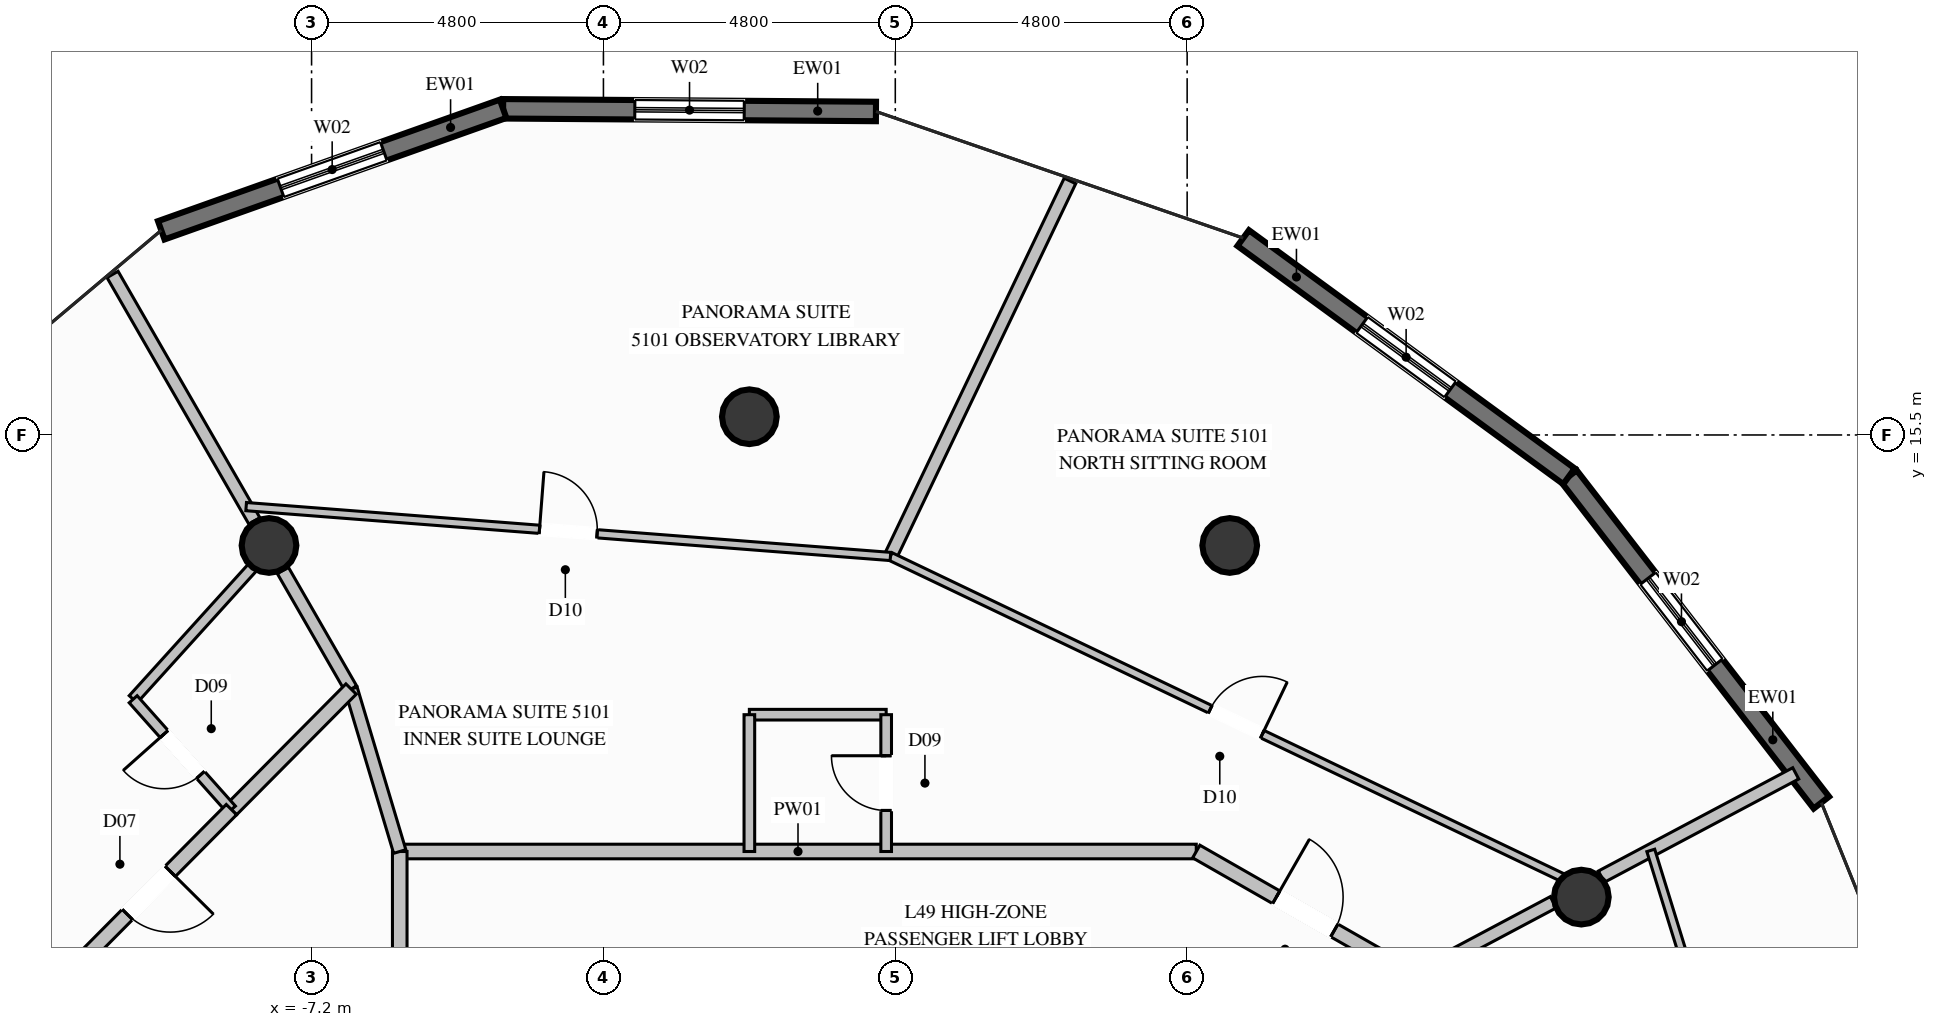
"""IFC4 building model, lengths in metres.
Left out: names, types, materials, properties, quantities, classifications, styles, units other than length and angle.
Written with IfcOpenShell. Run it as: python <this file> out.ifc"""

import sys

from ifc_helpers import new_model, si_unit, direction, frame, frame_2d, origin, origin_2d, place, context, subcontext, project, spatial, rectangle, circle, extrude, element, fill, save


model = new_model("IFC4")
c1 = context("Model", 3, precision=1e-05, world=origin(), true_north=direction((0.0, 1.0)))
c2 = subcontext(c1, "Body", "Model", "MODEL_VIEW")
j1 = project(units=[si_unit("LENGTHUNIT", "METRE"), si_unit("PLANEANGLEUNIT", "RADIAN")], contexts=[c1])
p1 = place(None, origin())
s1 = spatial("IfcSite", under=j1, at=p1, CompositionType="ELEMENT")
p2 = place(p1, origin())
s2 = spatial("IfcBuilding", under=s1, at=p2, CompositionType="ELEMENT")
p3 = place(p2, frame((0.0, 0.0, 191.2)))
s3 = spatial("IfcBuildingStorey", under=s2, at=p3, CompositionType="ELEMENT", Elevation=191.2)
for number, where, z_axis, x_axis in (
    (1, (13.683, 7.9, 0.0), (0.0, 0.0, 1.0), (1.0, 0.0, 0.0)),
    (2, (7.9, 13.683, 0.0), (0.0, 0.0, 1.0), (1.0, 0.0, 0.0)),
    (3, (0.0, 15.8, 0.0), (0.0, 0.0, 1.0), (1.0, 0.0, 0.0)),
    (4, (-7.9, 13.683, 0.0), (0.0, 0.0, 1.0), (1.0, 0.0, 0.0)),
):
    element("IfcColumn", number, at=place(p3, frame(where, z_axis=z_axis, x_axis=x_axis)), inside=s3, PredefinedType="COLUMN", context=c2, shape_type="SweptSolid", body=[
        extrude(circle(Radius=0.45, at=origin_2d()), origin(), (0.0, 0.0, 1.0), 3.6),
    ])
p4 = place(p3, frame((13.48, 14.821, 0.0), z_axis=(0.0, 0.0, 1.0), x_axis=(0.611810985794, -0.791003993455, 0.0)))
e5 = element("IfcWall", 5, at=p4, inside=s3, PredefinedType="SOLIDWALL", context=c2, shape_type="SweptSolid", body=[
    extrude(rectangle(XDim=6.785, YDim=0.32, at=frame_2d((3.393, 0.0))), origin(), (0.0, 0.0, 1.0), 3.36),
])
p5 = place(p4, frame((2.123, 0.0, 0.35)))
e6 = element("IfcOpeningElement", 6, at=p5, cuts=e5, PredefinedType="OPENING", context=c2, shape_type="SweptSolid", body=[
    extrude(rectangle(XDim=1.8, YDim=2.6, at=frame_2d((0.9, 1.3))), frame((0.0, 0.17, 0.0), z_axis=(0.0, -1.0, 0.0), x_axis=(1.0, 0.0, 0.0)), (0.0, 0.0, 1.0), 0.34),
])
p6 = place(p3, frame((8.122, 18.738, 0.0), z_axis=(0.0, 0.0, 1.0), x_axis=(0.80727653181, -0.590173365368, 0.0)))
e7 = element("IfcWall", 7, at=p6, inside=s3, PredefinedType="SOLIDWALL", context=c2, shape_type="SweptSolid", body=[
    extrude(rectangle(XDim=6.637, YDim=0.32, at=frame_2d((3.318, 0.0))), origin(), (0.0, 0.0, 1.0), 3.36),
])
p7 = place(p6, frame((2.419, 0.0, 0.35)))
e8 = element("IfcOpeningElement", 8, at=p7, cuts=e7, PredefinedType="OPENING", context=c2, shape_type="SweptSolid", body=[
    extrude(rectangle(XDim=1.8, YDim=2.6, at=frame_2d((0.9, 1.3))), frame((0.0, 0.17, 0.0), z_axis=(0.0, -1.0, 0.0), x_axis=(1.0, 0.0, 0.0)), (0.0, 0.0, 1.0), 0.34),
])
p8 = place(p3, frame((-4.05, 20.864, 0.0), z_axis=(0.0, 0.0, 1.0), x_axis=(0.999974321908, -0.007166276942, 0.0)))
e9 = element("IfcWall", 9, at=p8, inside=s3, PredefinedType="SOLIDWALL", context=c2, shape_type="SweptSolid", body=[
    extrude(rectangle(XDim=6.132, YDim=0.32, at=frame_2d((3.066, 0.0))), origin(), (0.0, 0.0, 1.0), 3.36),
])
p9 = place(p8, frame((2.166, 0.0, 0.35)))
e10 = element("IfcOpeningElement", 10, at=p9, cuts=e9, PredefinedType="OPENING", context=c2, shape_type="SweptSolid", body=[
    extrude(rectangle(XDim=1.8, YDim=2.6, at=frame_2d((0.9, 1.3))), frame((0.0, 0.17, 0.0), z_axis=(0.0, -1.0, 0.0), x_axis=(1.0, 0.0, 0.0)), (0.0, 0.0, 1.0), 0.34),
])
p10 = place(p3, frame((-9.672, 18.866, 0.0), z_axis=(0.0, 0.0, 1.0), x_axis=(0.942262899703, 0.334874047732, 0.0)))
e11 = element("IfcWall", 11, at=p10, inside=s3, PredefinedType="SOLIDWALL", context=c2, shape_type="SweptSolid", body=[
    extrude(rectangle(XDim=5.967, YDim=0.32, at=frame_2d((2.983, 0.0))), origin(), (0.0, 0.0, 1.0), 3.36),
])
p11 = place(p10, frame((2.083, 0.0, 0.35)))
e12 = element("IfcOpeningElement", 12, at=p11, cuts=e11, PredefinedType="OPENING", context=c2, shape_type="SweptSolid", body=[
    extrude(rectangle(XDim=1.8, YDim=2.6, at=frame_2d((0.9, 1.3))), frame((0.0, 0.17, 0.0), z_axis=(0.0, -1.0, 0.0), x_axis=(1.0, 0.0, 0.0)), (0.0, 0.0, 1.0), 0.34),
])
p12 = place(p3, frame((-5.75, 8.65, 0.0), z_axis=(0.0, 0.0, 1.0), x_axis=(1.0, 0.0, 0.0)))
e13 = element("IfcWall", 13, at=p12, inside=s3, PredefinedType="PARTITIONING", context=c2, shape_type="SweptSolid", body=[
    extrude(rectangle(XDim=13.1, YDim=0.24, at=frame_2d((6.55, 0.0))), origin(), (0.0, 0.0, 1.0), 3.36),
])
p13 = place(p3, frame((-5.75, 6.1, 0.0), z_axis=(0.0, 0.0, 1.0), x_axis=(0.0, 1.0, 0.0)))
e14 = element("IfcWall", 14, at=p13, inside=s3, PredefinedType="PARTITIONING", context=c2, shape_type="SweptSolid", body=[
    extrude(rectangle(XDim=2.55, YDim=0.24, at=frame_2d((1.275, 0.0))), origin(), (0.0, 0.0, 1.0), 3.36),
])
p14 = place(p3, frame((10.935, 6.6, 0.0), z_axis=(0.0, 0.0, 1.0), x_axis=(0.883041221412, 0.469295430711, 0.0)))
e15 = element("IfcWall", 15, at=p14, inside=s3, PredefinedType="PARTITIONING", context=c2, shape_type="SweptSolid", body=[
    extrude(rectangle(XDim=2.589, YDim=0.21, at=frame_2d((1.294, 0.0))), origin(), (0.0, 0.0, 1.0), 2.876),
])
p15 = place(p3, frame((14.012, 8.236, 0.0), z_axis=(0.0, 0.0, 1.0), x_axis=(0.883051974866, 0.469275196112, 0.0)))
e16 = element("IfcWall", 16, at=p15, inside=s3, PredefinedType="PARTITIONING", context=c2, shape_type="SweptSolid", body=[
    extrude(rectangle(XDim=3.62, YDim=0.21, at=frame_2d((1.81, 0.0))), origin(), (0.0, 0.0, 1.0), 3.36),
])
p16 = place(p3, frame((-6.55, 11.322, 0.0), z_axis=(0.0, 0.0, 1.0), x_axis=(-0.498754501597, 0.866743299447, 0.0)))
e17 = element("IfcWall", 17, at=p16, inside=s3, PredefinedType="PARTITIONING", context=c2, shape_type="SweptSolid", body=[
    extrude(rectangle(XDim=2.25, YDim=0.21, at=frame_2d((1.125, 0.0))), origin(), (0.0, 0.0, 1.0), 2.876),
])
p17 = place(p3, frame((-8.141, 14.087, 0.0), z_axis=(0.0, 0.0, 1.0), x_axis=(-0.498683982258, 0.866783874931, 0.0)))
e18 = element("IfcWall", 18, at=p17, inside=s3, PredefinedType="PARTITIONING", context=c2, shape_type="SweptSolid", body=[
    extrude(rectangle(XDim=4.676, YDim=0.21, at=frame_2d((2.338, 0.0))), origin(), (0.0, 0.0, 1.0), 3.36),
])
p18 = place(p3, frame((-11.235, 6.6, 0.0), z_axis=(0.0, 0.0, 1.0), x_axis=(-0.873226015114, 0.487315428165, 0.0)))
e19 = element("IfcWall", 19, at=p18, inside=s3, PredefinedType="PARTITIONING", context=c2, shape_type="SweptSolid", body=[
    extrude(rectangle(XDim=2.304, YDim=0.21, at=frame_2d((1.152, 0.0))), origin(), (0.0, 0.0, 1.0), 2.876),
])
p19 = place(p3, frame((0.0, 10.9, 0.0), z_axis=(0.0, 0.0, 1.0), x_axis=(1.0, 0.0, 0.0)))
e20 = element("IfcWall", 20, at=p19, inside=s3, PredefinedType="PLUMBINGWALL", context=c2, shape_type="SweptSolid", body=[
    extrude(rectangle(XDim=2.25, YDim=0.175, at=frame_2d((1.125, 0.0))), origin(), (0.0, 0.0, 1.0), 3.042),
])
p20 = place(p3, frame((0.0, 10.9, 0.0), z_axis=(0.0, 0.0, 1.0), x_axis=(0.0, -1.0, 0.0)))
e21 = element("IfcWall", 21, at=p20, inside=s3, PredefinedType="PLUMBINGWALL", context=c2, shape_type="SweptSolid", body=[
    extrude(rectangle(XDim=2.25, YDim=0.175, at=frame_2d((1.125, 0.0))), origin(), (0.0, 0.0, 1.0), 3.36),
])
p21 = place(p3, frame((2.25, 8.65, 0.0), z_axis=(0.0, 0.0, 1.0), x_axis=(0.0, 1.0, 0.0)))
e22 = element("IfcWall", 22, at=p21, inside=s3, PredefinedType="PLUMBINGWALL", context=c2, shape_type="SweptSolid", body=[
    extrude(rectangle(XDim=2.25, YDim=0.175, at=frame_2d((1.125, 0.0))), origin(), (0.0, 0.0, 1.0), 3.36),
])
p22 = place(p21, frame((0.675, 0.0, 0.0)))
e23 = element("IfcOpeningElement", 23, at=p22, cuts=e22, PredefinedType="OPENING", context=c2, shape_type="SweptSolid", body=[
    extrude(rectangle(XDim=0.9, YDim=2.1, at=frame_2d((0.45, 1.05))), frame((0.0, 0.098, 0.0), z_axis=(0.0, -1.0, 0.0), x_axis=(1.0, 0.0, 0.0)), (0.0, 0.0, 1.0), 0.195),
])
p23 = place(p3, frame((-6.55, 11.322, 0.0), z_axis=(0.0, 0.0, 1.0), x_axis=(0.286825893059, -0.957982727961, 0.0)))
e24 = element("IfcWall", 24, at=p23, inside=s3, PredefinedType="PARTITIONING", context=c2, shape_type="SweptSolid", body=[
    extrude(rectangle(XDim=2.789, YDim=0.21, at=frame_2d((1.395, 0.0))), origin(), (0.0, 0.0, 1.0), 3.36),
])
p24 = place(p3, frame((7.35, 8.65, 0.0), z_axis=(0.0, 0.0, 1.0), x_axis=(0.868112139229, -0.496368123193, 0.0)))
e25 = element("IfcWall", 25, at=p24, inside=s3, PredefinedType="PARTITIONING", context=c2, shape_type="SweptSolid", body=[
    extrude(rectangle(XDim=4.13, YDim=0.24, at=frame_2d((2.065, 0.0))), origin(), (0.0, 0.0, 1.0), 3.36),
])
p25 = place(p24, frame((1.515, 0.0, 0.0)))
e26 = element("IfcOpeningElement", 26, at=p25, cuts=e25, PredefinedType="OPENING", context=c2, shape_type="SweptSolid", body=[
    extrude(rectangle(XDim=1.1, YDim=2.3, at=frame_2d((0.55, 1.15))), frame((0.0, 0.13, 0.0), z_axis=(0.0, -1.0, 0.0), x_axis=(1.0, 0.0, 0.0)), (0.0, 0.0, 1.0), 0.26),
])
p26 = place(p3, frame((2.32, 13.502, 0.0), z_axis=(0.0, 0.0, 1.0), x_axis=(0.431352014973, 0.902183705893, 0.0)))
e27 = element("IfcWall", 27, at=p26, inside=s3, PredefinedType="PARTITIONING", context=c2, shape_type="SweptSolid", body=[
    extrude(rectangle(XDim=6.846, YDim=0.21, at=frame_2d((3.423, 0.0))), origin(), (0.0, 0.0, 1.0), 3.36),
])
p27 = place(p3, frame((2.32, 13.502, 0.0), z_axis=(0.0, 0.0, 1.0), x_axis=(0.90230783313, -0.431092303656, 0.0)))
e28 = element("IfcWall", 28, at=p27, inside=s3, PredefinedType="PARTITIONING", context=c2, shape_type="SweptSolid", body=[
    extrude(rectangle(XDim=12.608, YDim=0.135, at=frame_2d((6.304, 0.0))), origin(), (0.0, 0.0, 1.0), 2.929),
])
p28 = place(p27, frame((5.829, 0.0, 0.0)))
e29 = element("IfcOpeningElement", 29, at=p28, cuts=e28, PredefinedType="OPENING", context=c2, shape_type="SweptSolid", body=[
    extrude(rectangle(XDim=0.95, YDim=2.1, at=frame_2d((0.475, 1.05))), frame((0.0, 0.078, 0.0), z_axis=(0.0, -1.0, 0.0), x_axis=(1.0, 0.0, 0.0)), (0.0, 0.0, 1.0), 0.155),
])
p29 = place(p3, frame((-8.276, 14.322, 0.0), z_axis=(0.0, 0.0, 1.0), x_axis=(0.997018431195, -0.077163772963, 0.0)))
e30 = element("IfcWall", 30, at=p29, inside=s3, PredefinedType="PARTITIONING", context=c2, shape_type="SweptSolid", body=[
    extrude(rectangle(XDim=10.628, YDim=0.135, at=frame_2d((5.314, 0.0))), origin(), (0.0, 0.0, 1.0), 3.36),
])
p30 = place(p29, frame((4.839, 0.0, 0.0)))
e31 = element("IfcOpeningElement", 31, at=p30, cuts=e30, PredefinedType="OPENING", context=c2, shape_type="SweptSolid", body=[
    extrude(rectangle(XDim=0.95, YDim=2.1, at=frame_2d((0.475, 1.05))), frame((0.0, 0.078, 0.0), z_axis=(0.0, -1.0, 0.0), x_axis=(1.0, 0.0, 0.0)), (0.0, 0.0, 1.0), 0.155),
])
p31 = place(p3, frame((-6.55, 11.322, 0.0), z_axis=(0.0, 0.0, 1.0), x_axis=(-0.704436417235, -0.709767098472, 0.0)))
e32 = element("IfcWall", 32, at=p31, inside=s3, PredefinedType="PARTITIONING", context=c2, shape_type="SweptSolid", body=[
    extrude(rectangle(XDim=2.794, YDim=0.24, at=frame_2d((1.397, 0.0))), origin(), (0.0, 0.0, 1.0), 3.36),
])
p32 = place(p3, frame((-7.884, 13.64, 0.0), z_axis=(0.0, 0.0, 1.0), x_axis=(-0.671062027172, -0.74140121101, 0.0)))
e33 = element("IfcWall", 33, at=p32, inside=s3, PredefinedType="PLUMBINGWALL", context=c2, shape_type="SweptSolid", body=[
    extrude(rectangle(XDim=3.353, YDim=0.175, at=frame_2d((1.676, 0.0))), origin(), (0.0, 0.0, 1.0), 2.929),
])
p33 = place(p3, frame((-8.518, 9.339, 0.0), z_axis=(0.0, 0.0, 1.0), x_axis=(-0.664980955203, 0.746860314395, 0.0)))
e34 = element("IfcWall", 34, at=p33, inside=s3, PredefinedType="PLUMBINGWALL", context=c2, shape_type="SweptSolid", body=[
    extrude(rectangle(XDim=2.43, YDim=0.175, at=frame_2d((1.215, 0.0))), origin(), (0.0, 0.0, 1.0), 3.36),
])
p34 = place(p33, frame((0.765, 0.0, 0.0)))
e35 = element("IfcOpeningElement", 35, at=p34, cuts=e34, PredefinedType="OPENING", context=c2, shape_type="SweptSolid", body=[
    extrude(rectangle(XDim=0.9, YDim=2.1, at=frame_2d((0.45, 1.05))), frame((0.0, 0.098, 0.0), z_axis=(0.0, -1.0, 0.0), x_axis=(1.0, 0.0, 0.0)), (0.0, 0.0, 1.0), 0.195),
])
p35 = place(p3, frame((-8.518, 9.339, 0.0), z_axis=(0.0, 0.0, 1.0), x_axis=(-0.7042534056, -0.70994868878, 0.0)))
e36 = element("IfcWall", 36, at=p35, inside=s3, PredefinedType="PARTITIONING", context=c2, shape_type="SweptSolid", body=[
    extrude(rectangle(XDim=3.858, YDim=0.24, at=frame_2d((1.929, 0.0))), origin(), (0.0, 0.0, 1.0), 3.36),
])
p36 = place(p35, frame((1.429, 0.0, 0.0)))
e37 = element("IfcOpeningElement", 37, at=p36, cuts=e36, PredefinedType="OPENING", context=c2, shape_type="SweptSolid", body=[
    extrude(rectangle(XDim=1.0, YDim=2.2, at=frame_2d((0.5, 1.1))), frame((0.0, 0.13, 0.0), z_axis=(0.0, -1.0, 0.0), x_axis=(1.0, 0.0, 0.0)), (0.0, 0.0, 1.0), 0.26),
])
p37 = place(p3, frame((17.488, 0.057, 0.0), z_axis=(0.0, 0.0, 1.0), x_axis=(-0.295455960415, 0.955356360451, 0.0)))
e38 = element("IfcWall", 38, at=p37, inside=s3, PredefinedType="PARTITIONING", context=c2, shape_type="SweptSolid", body=[
    extrude(rectangle(XDim=9.013, YDim=0.135, at=frame_2d((4.507, 0.0))), origin(), (0.0, 0.0, 1.0), 3.36),
])
p38 = place(p37, frame((4.032, 0.0, 0.0)))
e39 = element("IfcOpeningElement", 39, at=p38, cuts=e38, PredefinedType="OPENING", context=c2, shape_type="SweptSolid", body=[
    extrude(rectangle(XDim=0.95, YDim=2.1, at=frame_2d((0.475, 1.05))), frame((0.0, 0.078, 0.0), z_axis=(0.0, -1.0, 0.0), x_axis=(1.0, 0.0, 0.0)), (0.0, 0.0, 1.0), 0.155),
])
p39 = place(p5, origin())
e40 = element("IfcWindow", 40, at=p39, inside=s3, PartitioningType="SINGLE_PANEL", PredefinedType="WINDOW", context=c2, shape_type="SweptSolid", body=[
    extrude(rectangle(XDim=1.8, YDim=2.6, at=frame_2d((0.9, 1.3))), frame((0.0, 0.03, 0.0), z_axis=(0.0, -1.0, 0.0), x_axis=(1.0, 0.0, 0.0)), (0.0, 0.0, 1.0), 0.06),
])
fill(e6, e40)
p40 = place(p7, origin())
e41 = element("IfcWindow", 41, at=p40, inside=s3, PartitioningType="SINGLE_PANEL", PredefinedType="WINDOW", context=c2, shape_type="SweptSolid", body=[
    extrude(rectangle(XDim=1.8, YDim=2.6, at=frame_2d((0.9, 1.3))), frame((0.0, 0.03, 0.0), z_axis=(0.0, -1.0, 0.0), x_axis=(1.0, 0.0, 0.0)), (0.0, 0.0, 1.0), 0.06),
])
fill(e8, e41)
p41 = place(p9, origin())
e42 = element("IfcWindow", 42, at=p41, inside=s3, PartitioningType="SINGLE_PANEL", PredefinedType="WINDOW", context=c2, shape_type="SweptSolid", body=[
    extrude(rectangle(XDim=1.8, YDim=2.6, at=frame_2d((0.9, 1.3))), frame((0.0, 0.03, 0.0), z_axis=(0.0, -1.0, 0.0), x_axis=(1.0, 0.0, 0.0)), (0.0, 0.0, 1.0), 0.06),
])
fill(e10, e42)
p42 = place(p11, origin())
e43 = element("IfcWindow", 43, at=p42, inside=s3, PartitioningType="SINGLE_PANEL", PredefinedType="WINDOW", context=c2, shape_type="SweptSolid", body=[
    extrude(rectangle(XDim=1.8, YDim=2.6, at=frame_2d((0.9, 1.3))), frame((0.0, 0.03, 0.0), z_axis=(0.0, -1.0, 0.0), x_axis=(1.0, 0.0, 0.0)), (0.0, 0.0, 1.0), 0.06),
])
fill(e12, e43)
p43 = place(p22, origin())
e44 = element("IfcDoor", 44, at=p43, inside=s3, OperationType="SINGLE_SWING_RIGHT", PredefinedType="DOOR", context=c2, shape_type="SweptSolid", body=[
    extrude(rectangle(XDim=0.9, YDim=2.1, at=frame_2d((0.45, 1.05))), frame((0.0, 0.025, 0.0), z_axis=(0.0, -1.0, 0.0), x_axis=(1.0, 0.0, 0.0)), (0.0, 0.0, 1.0), 0.05),
])
fill(e23, e44)
p44 = place(p25, origin())
e45 = element("IfcDoor", 45, at=p44, inside=s3, OperationType="SINGLE_SWING_LEFT", PredefinedType="DOOR", context=c2, shape_type="SweptSolid", body=[
    extrude(rectangle(XDim=1.1, YDim=2.3, at=frame_2d((0.55, 1.15))), frame((0.0, 0.025, 0.0), z_axis=(0.0, -1.0, 0.0), x_axis=(1.0, 0.0, 0.0)), (0.0, 0.0, 1.0), 0.05),
])
fill(e26, e45)
p45 = place(p28, origin())
e46 = element("IfcDoor", 46, at=p45, inside=s3, OperationType="SINGLE_SWING_RIGHT", PredefinedType="DOOR", context=c2, shape_type="SweptSolid", body=[
    extrude(rectangle(XDim=0.95, YDim=2.1, at=frame_2d((0.475, 1.05))), frame((0.0, 0.025, 0.0), z_axis=(0.0, -1.0, 0.0), x_axis=(1.0, 0.0, 0.0)), (0.0, 0.0, 1.0), 0.05),
])
fill(e29, e46)
p46 = place(p30, origin())
e47 = element("IfcDoor", 47, at=p46, inside=s3, OperationType="SINGLE_SWING_LEFT", PredefinedType="DOOR", context=c2, shape_type="SweptSolid", body=[
    extrude(rectangle(XDim=0.95, YDim=2.1, at=frame_2d((0.475, 1.05))), frame((0.0, 0.025, 0.0), z_axis=(0.0, -1.0, 0.0), x_axis=(1.0, 0.0, 0.0)), (0.0, 0.0, 1.0), 0.05),
])
fill(e31, e47)
p47 = place(p34, origin())
e48 = element("IfcDoor", 48, at=p47, inside=s3, OperationType="SINGLE_SWING_RIGHT", PredefinedType="DOOR", context=c2, shape_type="SweptSolid", body=[
    extrude(rectangle(XDim=0.9, YDim=2.1, at=frame_2d((0.45, 1.05))), frame((0.0, 0.025, 0.0), z_axis=(0.0, -1.0, 0.0), x_axis=(1.0, 0.0, 0.0)), (0.0, 0.0, 1.0), 0.05),
])
fill(e35, e48)
p48 = place(p36, origin())
e49 = element("IfcDoor", 49, at=p48, inside=s3, OperationType="SINGLE_SWING_LEFT", PredefinedType="DOOR", context=c2, shape_type="SweptSolid", body=[
    extrude(rectangle(XDim=1.0, YDim=2.2, at=frame_2d((0.5, 1.1))), frame((0.0, 0.025, 0.0), z_axis=(0.0, -1.0, 0.0), x_axis=(1.0, 0.0, 0.0)), (0.0, 0.0, 1.0), 0.05),
])
fill(e37, e49)
save(model, sys.argv[1])
